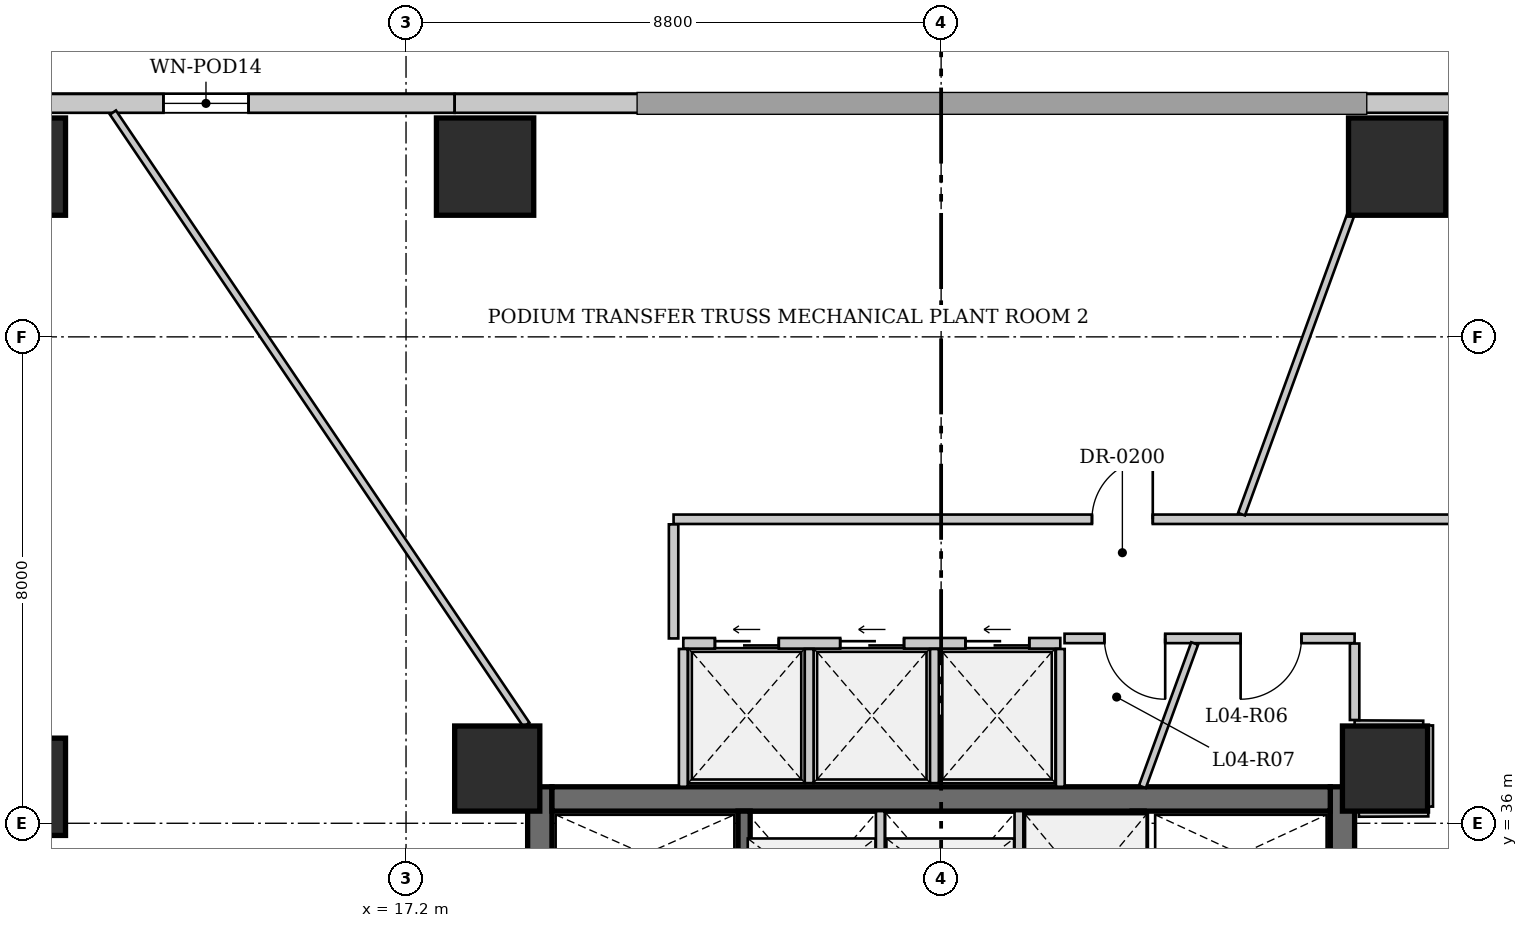
"""IFC4 building model, lengths in metres.
Left out: names, types, materials, properties, quantities, classifications, styles, units other than length and angle.
Written with IfcOpenShell. Run it as: python <this file> out.ifc"""

import sys

from ifc_helpers import new_model, si_unit, direction, frame, frame_2d, origin, origin_2d, place, context, subcontext, project, spatial, rectangle, extrude, source, transform, mapped, element, fill, save


model = new_model("IFC4")
c1 = context("Model", 3, precision=1e-05, world=origin(), true_north=direction((0.0, 1.0)))
c2 = subcontext(c1, "Body", "Model", "MODEL_VIEW")
j1 = project(units=[si_unit("LENGTHUNIT", "METRE"), si_unit("PLANEANGLEUNIT", "RADIAN")], contexts=[c1])
p1 = place(None, origin())
s1 = spatial("IfcSite", under=j1, at=p1, CompositionType="ELEMENT")
p2 = place(p1, origin())
s2 = spatial("IfcBuilding", under=s1, at=p2, CompositionType="ELEMENT")
p3 = place(p2, frame((0.0, 0.0, 19.0)))
s3 = spatial("IfcBuildingStorey", under=s2, at=p3, CompositionType="ELEMENT", Elevation=19.0)
for number, where, z_axis, x_axis in (
    (1, (10.8, 46.8, 0.0), (0.0, 0.0, 1.0), (1.0, 0.0, 0.0)),
    (2, (18.5, 46.8, 0.0), (0.0, 0.0, 1.0), (1.0, 0.0, 0.0)),
    (3, (33.5, 46.8, 0.0), (0.0, 0.0, 1.0), (1.0, 0.0, 0.0)),
    (4, (10.8, 36.6, 0.0), (0.0, 0.0, 1.0), (1.0, 0.0, 0.0)),
):
    element("IfcColumn", number, at=place(p3, frame(where, z_axis=z_axis, x_axis=x_axis)), inside=s3, PredefinedType="COLUMN", context=c2, shape_type="SweptSolid", body=[
        extrude(rectangle(XDim=1.6, YDim=1.6, at=origin_2d()), origin(), (0.0, 0.0, 1.0), 4.55),
    ])
for number, where, z_axis, x_axis in (
    (5, (33.3, 36.9, 0.0), (0.0, 0.0, 1.0), (1.0, 0.0, 0.0)),
    (6, (18.7, 36.9, 0.0), (0.0, 0.0, 1.0), (1.0, 0.0, 0.0)),
):
    element("IfcColumn", number, at=place(p3, frame(where, z_axis=z_axis, x_axis=x_axis)), inside=s3, PredefinedType="COLUMN", context=c2, shape_type="SweptSolid", body=[
        extrude(rectangle(XDim=1.4, YDim=1.4, at=origin_2d()), origin(), (0.0, 0.0, 1.0), 4.55),
    ])
p4 = place(p3, frame((0.16, 47.84, 0.0), z_axis=(0.0, 0.0, 1.0), x_axis=(1.0, 0.0, 0.0)))
e7 = element("IfcWall", 7, at=p4, inside=s3, PredefinedType="SOLIDWALL", context=c2, shape_type="SweptSolid", body=[
    extrude(rectangle(XDim=17.84, YDim=0.31, at=frame_2d((8.92, 0.0))), origin(), (0.0, 0.0, 1.0), 4.45),
])
p5 = place(p4, frame((7.0, 0.0, 0.95)))
e8 = element("IfcOpeningElement", 8, at=p5, cuts=e7, PredefinedType="OPENING", context=c2, shape_type="SweptSolid", body=[
    extrude(rectangle(XDim=1.4, YDim=2.2, at=frame_2d((0.7, 1.1))), frame((0.0, 0.165, 0.0), z_axis=(0.0, -1.0, 0.0), x_axis=(1.0, 0.0, 0.0)), (0.0, 0.0, 1.0), 0.33),
])
p6 = place(p4, frame((13.05, 0.0, 0.95)))
e9 = element("IfcOpeningElement", 9, at=p6, cuts=e7, PredefinedType="OPENING", context=c2, shape_type="SweptSolid", body=[
    extrude(rectangle(XDim=1.4, YDim=2.2, at=frame_2d((0.7, 1.1))), frame((0.0, 0.165, 0.0), z_axis=(0.0, -1.0, 0.0), x_axis=(1.0, 0.0, 0.0)), (0.0, 0.0, 1.0), 0.33),
])
p7 = place(p3, frame((18.0, 47.84, 0.0), z_axis=(0.0, 0.0, 1.0), x_axis=(1.0, 0.0, 0.0)))
e10 = element("IfcWall", 10, at=p7, inside=s3, PredefinedType="SOLIDWALL", context=c2, shape_type="SweptSolid", body=[
    extrude(rectangle(XDim=18.0, YDim=0.31, at=frame_2d((9.0, 0.0))), origin(), (0.0, 0.0, 1.0), 4.45),
])
p8 = place(p3, frame((19.4, 25.8, 0.0), z_axis=(0.0, 0.0, 1.0), x_axis=(0.0, 1.0, 0.0)))
e11 = element("IfcWall", 11, at=p8, inside=s3, PredefinedType="SHEAR", context=c2, shape_type="SweptSolid", body=[
    extrude(rectangle(XDim=10.8, YDim=0.4, at=frame_2d((5.4, 0.0))), origin(), (0.0, 0.0, 1.0), 5.0),
])
p9 = place(p3, frame((32.6, 36.6, 0.0), z_axis=(0.0, 0.0, 1.0), x_axis=(0.0, -1.0, 0.0)))
e12 = element("IfcWall", 12, at=p9, inside=s3, PredefinedType="SHEAR", context=c2, shape_type="SweptSolid", body=[
    extrude(rectangle(XDim=10.8, YDim=0.4, at=frame_2d((5.4, 0.0))), origin(), (0.0, 0.0, 1.0), 5.0),
])
p10 = place(p9, frame((3.7, 0.0, 0.0)))
e13 = element("IfcOpeningElement", 13, at=p10, cuts=e12, PredefinedType="OPENING", context=c2, shape_type="SweptSolid", body=[
    extrude(rectangle(XDim=1.05, YDim=2.15, at=frame_2d((0.525, 1.075))), frame((0.0, 0.21, 0.0), z_axis=(0.0, -1.0, 0.0), x_axis=(1.0, 0.0, 0.0)), (0.0, 0.0, 1.0), 0.42),
])
p11 = place(p3, frame((19.6, 36.4, 0.0), z_axis=(0.0, 0.0, 1.0), x_axis=(1.0, 0.0, 0.0)))
e14 = element("IfcWall", 14, at=p11, inside=s3, PredefinedType="SHEAR", context=c2, shape_type="SweptSolid", body=[
    extrude(rectangle(XDim=12.8, YDim=0.4, at=frame_2d((6.4, 0.0))), origin(), (0.0, 0.0, 1.0), 5.0),
])
p12 = place(p3, frame((22.76, 26.2, 0.0), z_axis=(0.0, 0.0, 1.0), x_axis=(0.0, 1.0, 0.0)))
e15 = element("IfcWall", 15, at=p12, inside=s3, PredefinedType="SHEAR", context=c2, shape_type="SweptSolid", body=[
    extrude(rectangle(XDim=10.0, YDim=0.2, at=frame_2d((5.0, 0.0))), origin(), (0.0, 0.0, 1.0), 5.0),
])
p13 = place(p3, frame((29.24, 26.2, 0.0), z_axis=(0.0, 0.0, 1.0), x_axis=(0.0, 1.0, 0.0)))
e16 = element("IfcWall", 16, at=p13, inside=s3, PredefinedType="SHEAR", context=c2, shape_type="SweptSolid", body=[
    extrude(rectangle(XDim=10.0, YDim=0.2, at=frame_2d((5.0, 0.0))), origin(), (0.0, 0.0, 1.0), 5.0),
])
p14 = place(p13, frame((5.65, 0.0, 0.0)))
e17 = element("IfcOpeningElement", 17, at=p14, cuts=e16, PredefinedType="OPENING", context=c2, shape_type="SweptSolid", body=[
    extrude(rectangle(XDim=1.05, YDim=2.15, at=frame_2d((0.525, 1.075))), frame((0.0, 0.11, 0.0), z_axis=(0.0, -1.0, 0.0), x_axis=(1.0, 0.0, 0.0)), (0.0, 0.0, 1.0), 0.22),
])
for number, where, z_axis, x_axis in (
    (18, (25.0, 33.743, 0.0), (0.0, 0.0, 1.0), (0.0, 1.0, 0.0)),
    (19, (27.28, 33.743, 0.0), (0.0, 0.0, 1.0), (0.0, 1.0, 0.0)),
):
    element("IfcWall", number, at=place(p3, frame(where, z_axis=z_axis, x_axis=x_axis)), inside=s3, PredefinedType="SOLIDWALL", context=c2, shape_type="SweptSolid", body=[
        extrude(rectangle(XDim=2.457, YDim=0.145, at=frame_2d((1.228, 0.0))), origin(), (0.0, 0.0, 1.0), 4.55),
    ])
p15 = place(p3, frame((21.76, 38.96, 0.0), z_axis=(0.0, 0.0, 1.0), x_axis=(1.0, 0.0, 0.0)))
e20 = element("IfcWall", 20, at=p15, inside=s3, PredefinedType="SOLIDWALL", context=c2, shape_type="SweptSolid", body=[
    extrude(rectangle(XDim=6.2, YDim=0.175, at=frame_2d((3.1, 0.0))), origin(), (0.0, 0.0, 1.0), 4.55),
])
p16 = place(p15, frame((0.52, 0.0, 0.0)))
e21 = element("IfcOpeningElement", 21, at=p16, cuts=e20, PredefinedType="OPENING", context=c2, shape_type="SweptSolid", body=[
    extrude(rectangle(XDim=1.05, YDim=2.15, at=frame_2d((0.525, 1.075))), frame((0.0, 0.098, 0.0), z_axis=(0.0, -1.0, 0.0), x_axis=(1.0, 0.0, 0.0)), (0.0, 0.0, 1.0), 0.195),
])
p17 = place(p15, frame((2.58, 0.0, 0.0)))
e22 = element("IfcOpeningElement", 22, at=p17, cuts=e20, PredefinedType="OPENING", context=c2, shape_type="SweptSolid", body=[
    extrude(rectangle(XDim=1.05, YDim=2.15, at=frame_2d((0.525, 1.075))), frame((0.0, 0.098, 0.0), z_axis=(0.0, -1.0, 0.0), x_axis=(1.0, 0.0, 0.0)), (0.0, 0.0, 1.0), 0.195),
])
p18 = place(p15, frame((4.64, 0.0, 0.0)))
e23 = element("IfcOpeningElement", 23, at=p18, cuts=e20, PredefinedType="OPENING", context=c2, shape_type="SweptSolid", body=[
    extrude(rectangle(XDim=1.05, YDim=2.15, at=frame_2d((0.525, 1.075))), frame((0.0, 0.098, 0.0), z_axis=(0.0, -1.0, 0.0), x_axis=(1.0, 0.0, 0.0)), (0.0, 0.0, 1.0), 0.195),
])
for number, where, z_axis, x_axis in (
    (24, (21.76, 36.6, 0.0), (0.0, 0.0, 1.0), (0.0, 1.0, 0.0)),
    (25, (27.96, 36.6, 0.0), (0.0, 0.0, 1.0), (0.0, 1.0, 0.0)),
):
    element("IfcWall", number, at=place(p3, frame(where, z_axis=z_axis, x_axis=x_axis)), inside=s3, PredefinedType="SOLIDWALL", context=c2, shape_type="SweptSolid", body=[
        extrude(rectangle(XDim=2.266, YDim=0.145, at=frame_2d((1.133, 0.0))), origin(), (0.0, 0.0, 1.0), 4.55),
    ])
for number, where, z_axis, x_axis in (
    (26, (23.83, 36.66, 0.0), (0.0, 0.0, 1.0), (0.0, 1.0, 0.0)),
    (27, (25.89, 36.66, 0.0), (0.0, 0.0, 1.0), (0.0, 1.0, 0.0)),
):
    element("IfcWall", number, at=place(p3, frame(where, z_axis=z_axis, x_axis=x_axis)), inside=s3, PredefinedType="SOLIDWALL", context=c2, shape_type="SweptSolid", body=[
        extrude(rectangle(XDim=2.207, YDim=0.145, at=frame_2d((1.103, 0.0))), origin(), (0.0, 0.0, 1.0), 4.55),
    ])
p19 = place(p3, frame((32.8, 39.04, 0.0), z_axis=(0.0, 0.0, 1.0), x_axis=(-1.0, 0.0, 0.0)))
e28 = element("IfcWall", 28, at=p19, inside=s3, PredefinedType="PARTITIONING", context=c2, shape_type="SweptSolid", body=[
    extrude(rectangle(XDim=4.77, YDim=0.155, at=frame_2d((2.385, 0.0))), origin(), (0.0, 0.0, 1.0), 4.55),
])
p20 = place(p19, frame((0.875, 0.0, 0.0)))
e29 = element("IfcOpeningElement", 29, at=p20, cuts=e28, PredefinedType="OPENING", context=c2, shape_type="SweptSolid", body=[
    extrude(rectangle(XDim=1.0, YDim=2.15, at=frame_2d((0.5, 1.075))), frame((0.0, 0.087, 0.0), z_axis=(0.0, -1.0, 0.0), x_axis=(1.0, 0.0, 0.0)), (0.0, 0.0, 1.0), 0.175),
])
p21 = place(p19, frame((3.115, 0.0, 0.0)))
e30 = element("IfcOpeningElement", 30, at=p21, cuts=e28, PredefinedType="OPENING", context=c2, shape_type="SweptSolid", body=[
    extrude(rectangle(XDim=1.0, YDim=2.15, at=frame_2d((0.5, 1.075))), frame((0.0, 0.087, 0.0), z_axis=(0.0, -1.0, 0.0), x_axis=(1.0, 0.0, 0.0)), (0.0, 0.0, 1.0), 0.175),
])
p22 = place(p3, frame((21.6, 41.0, 0.0), z_axis=(0.0, 0.0, 1.0), x_axis=(1.0, 0.0, 0.0)))
e31 = element("IfcWall", 31, at=p22, inside=s3, PredefinedType="PARTITIONING", context=c2, shape_type="SweptSolid", body=[
    extrude(rectangle(XDim=14.2, YDim=0.155, at=frame_2d((7.1, 0.0))), origin(), (0.0, 0.0, 1.0), 4.55),
])
p23 = place(p22, frame((6.881, 0.0, 0.0)))
e32 = element("IfcOpeningElement", 32, at=p23, cuts=e31, PredefinedType="OPENING", context=c2, shape_type="SweptSolid", body=[
    extrude(rectangle(XDim=1.0, YDim=2.15, at=frame_2d((0.5, 1.075))), frame((0.0, 0.087, 0.0), z_axis=(0.0, -1.0, 0.0), x_axis=(1.0, 0.0, 0.0)), (0.0, 0.0, 1.0), 0.175),
])
p24 = place(p3, frame((32.87, 36.185, 0.0), z_axis=(0.0, 0.0, 1.0), x_axis=(0.999988932255, 0.00470482389, 0.0)))
e33 = element("IfcWall", 33, at=p24, inside=s3, PredefinedType="PARTITIONING", context=c2, shape_type="SweptSolid", body=[
    extrude(rectangle(XDim=1.142, YDim=0.155, at=frame_2d((0.571, 0.0))), origin(), (0.0, 0.0, 1.0), 4.55),
])
p25 = place(p3, frame((34.012, 36.274, 0.0), z_axis=(0.0, 0.0, 1.0), x_axis=(0.0, 1.0, 0.0)))
e34 = element("IfcWall", 34, at=p25, inside=s3, PredefinedType="PARTITIONING", context=c2, shape_type="SweptSolid", body=[
    extrude(rectangle(XDim=1.336, YDim=0.155, at=frame_2d((0.668, 0.0))), origin(), (0.0, 0.0, 1.0), 4.55),
])
p26 = place(p3, frame((33.928, 37.61, 0.0), z_axis=(0.0, 0.0, 1.0), x_axis=(-0.999989669582, 0.004545407589, 0.0)))
e35 = element("IfcWall", 35, at=p26, inside=s3, PredefinedType="PARTITIONING", context=c2, shape_type="SweptSolid", body=[
    extrude(rectangle(XDim=1.128, YDim=0.155, at=frame_2d((0.564, 0.0))), origin(), (0.0, 0.0, 1.0), 4.55),
])
p27 = place(p3, frame((32.8, 37.698, 0.0), z_axis=(0.0, 0.0, 1.0), x_axis=(0.0, 1.0, 0.0)))
e36 = element("IfcWall", 36, at=p27, inside=s3, PredefinedType="PARTITIONING", context=c2, shape_type="SweptSolid", body=[
    extrude(rectangle(XDim=1.258, YDim=0.155, at=frame_2d((0.629, 0.0))), origin(), (0.0, 0.0, 1.0), 4.55),
])
p28 = place(p3, frame((21.6, 39.04, 0.0), z_axis=(0.0, 0.0, 1.0), x_axis=(0.0, 1.0, 0.0)))
e37 = element("IfcWall", 37, at=p28, inside=s3, PredefinedType="PARTITIONING", context=c2, shape_type="SweptSolid", body=[
    extrude(rectangle(XDim=1.876, YDim=0.155, at=frame_2d((0.938, 0.0))), origin(), (0.0, 0.0, 1.0), 4.55),
])
p29 = place(p3, frame((30.94, 41.083, 0.0), z_axis=(0.0, 0.0, 1.0), x_axis=(0.34265121701, 0.939462688712, 0.0)))
e38 = element("IfcWall", 38, at=p29, inside=s3, PredefinedType="PARTITIONING", context=c2, shape_type="SweptSolid", body=[
    extrude(rectangle(XDim=5.223, YDim=0.12, at=frame_2d((2.611, 0.0))), origin(), (0.0, 0.0, 1.0), 4.55),
])
p30 = place(p3, frame((29.31, 36.6, 0.0), z_axis=(0.0, 0.0, 1.0), x_axis=(0.342618216876, 0.939474724229, 0.0)))
e39 = element("IfcWall", 39, at=p30, inside=s3, PredefinedType="PARTITIONING", context=c2, shape_type="SweptSolid", body=[
    extrude(rectangle(XDim=2.508, YDim=0.12, at=frame_2d((1.254, 0.0))), origin(), (0.0, 0.0, 1.0), 4.55),
])
p31 = place(p3, frame((19.18, 37.62, 0.0), z_axis=(0.0, 0.0, 1.0), x_axis=(-0.559637794354, 0.828737316121, 0.0)))
e40 = element("IfcWall", 40, at=p31, inside=s3, PredefinedType="PARTITIONING", context=c2, shape_type="SweptSolid", body=[
    extrude(rectangle(XDim=12.151, YDim=0.12, at=frame_2d((6.075, 0.0))), origin(), (0.0, 0.0, 1.0), 4.55),
])
m1 = source(origin(), c2, "Body", "SweptSolid", [
    extrude(rectangle(XDim=1.4, YDim=2.2, at=frame_2d((0.7, 1.1))), frame((0.0, 0.03, 0.0), z_axis=(0.0, -1.0, 0.0), x_axis=(1.0, 0.0, 0.0)), (0.0, 0.0, 1.0), 0.06),
])
p32 = place(p6, origin())
e41 = element("IfcWindow", 41, at=p32, inside=s3, PartitioningType="SINGLE_PANEL", PredefinedType="WINDOW", context=c2, shape_type="MappedRepresentation", body=[
    mapped(m1, transform((0.0, 0.0, 0.0), x_axis=(1.0, 0.0, 0.0), y_axis=(0.0, 1.0, 0.0), z_axis=(0.0, 0.0, 1.0), scale=1.0)),
])
fill(e9, e41)
m2 = source(origin(), c2, "Body", "SweptSolid", [
    extrude(rectangle(XDim=1.05, YDim=2.15, at=frame_2d((0.525, 1.075))), frame((0.0, 0.025, 0.0), z_axis=(0.0, -1.0, 0.0), x_axis=(1.0, 0.0, 0.0)), (0.0, 0.0, 1.0), 0.05),
])
p33 = place(p16, origin())
e42 = element("IfcDoor", 42, at=p33, inside=s3, OperationType="SLIDING_TO_LEFT", PredefinedType="DOOR", context=c2, shape_type="MappedRepresentation", body=[
    mapped(m2, transform((0.0, 0.0, 0.0), x_axis=(1.0, 0.0, 0.0), y_axis=(0.0, 1.0, 0.0), z_axis=(0.0, 0.0, 1.0), scale=1.0)),
])
fill(e21, e42)
p34 = place(p17, origin())
e43 = element("IfcDoor", 43, at=p34, inside=s3, OperationType="SLIDING_TO_LEFT", PredefinedType="DOOR", context=c2, shape_type="MappedRepresentation", body=[
    mapped(m2, transform((0.0, 0.0, 0.0), x_axis=(1.0, 0.0, 0.0), y_axis=(0.0, 1.0, 0.0), z_axis=(0.0, 0.0, 1.0), scale=1.0)),
])
fill(e22, e43)
p35 = place(p18, origin())
e44 = element("IfcDoor", 44, at=p35, inside=s3, OperationType="SLIDING_TO_LEFT", PredefinedType="DOOR", context=c2, shape_type="MappedRepresentation", body=[
    mapped(m2, transform((0.0, 0.0, 0.0), x_axis=(1.0, 0.0, 0.0), y_axis=(0.0, 1.0, 0.0), z_axis=(0.0, 0.0, 1.0), scale=1.0)),
])
fill(e23, e44)
m3 = source(origin(), c2, "Body", "SweptSolid", [
    extrude(rectangle(XDim=1.0, YDim=2.15, at=frame_2d((0.5, 1.075))), frame((0.0, 0.025, 0.0), z_axis=(0.0, -1.0, 0.0), x_axis=(1.0, 0.0, 0.0)), (0.0, 0.0, 1.0), 0.05),
])
p36 = place(p20, origin())
e45 = element("IfcDoor", 45, at=p36, inside=s3, OperationType="SINGLE_SWING_RIGHT", PredefinedType="DOOR", context=c2, shape_type="MappedRepresentation", body=[
    mapped(m3, transform((0.0, 0.0, 0.0), x_axis=(1.0, 0.0, 0.0), y_axis=(0.0, 1.0, 0.0), z_axis=(0.0, 0.0, 1.0), scale=1.0)),
])
fill(e29, e45)
p37 = place(p21, origin())
e46 = element("IfcDoor", 46, at=p37, inside=s3, OperationType="SINGLE_SWING_LEFT", PredefinedType="DOOR", context=c2, shape_type="MappedRepresentation", body=[
    mapped(m3, transform((0.0, 0.0, 0.0), x_axis=(1.0, 0.0, 0.0), y_axis=(0.0, 1.0, 0.0), z_axis=(0.0, 0.0, 1.0), scale=1.0)),
])
fill(e30, e46)
p38 = place(p23, origin())
e47 = element("IfcDoor", 47, at=p38, inside=s3, OperationType="SINGLE_SWING_RIGHT", PredefinedType="DOOR", context=c2, shape_type="MappedRepresentation", body=[
    mapped(m3, transform((0.0, 0.0, 0.0), x_axis=(1.0, 0.0, 0.0), y_axis=(0.0, 1.0, 0.0), z_axis=(0.0, 0.0, 1.0), scale=1.0)),
])
fill(e32, e47)
save(model, sys.argv[1])
